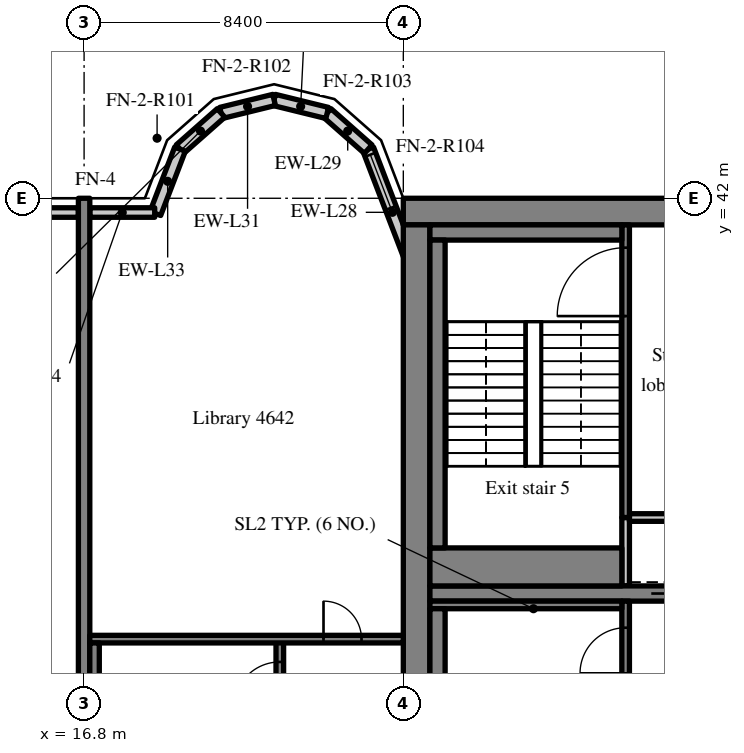
"""IFC4 building model, lengths in metres.
Left out: names, types, materials, properties, quantities, classifications, styles, units other than length and angle.
Written with IfcOpenShell. Run it as: python <this file> out.ifc"""

import sys

from ifc_helpers import new_model, si_unit, direction, frame, frame_2d, origin, place, context, subcontext, project, spatial, rectangle, extrude, source, transform, mapped, element, fill, save


model = new_model("IFC4")
c1 = context("Model", 3, precision=1e-05, world=origin(), true_north=direction((0.0, 1.0)))
c2 = subcontext(c1, "Body", "Model", "MODEL_VIEW")
j1 = project(units=[si_unit("LENGTHUNIT", "METRE"), si_unit("PLANEANGLEUNIT", "RADIAN")], contexts=[c1])
p1 = place(None, origin())
s1 = spatial("IfcSite", under=j1, at=p1, CompositionType="ELEMENT")
p2 = place(p1, origin())
s2 = spatial("IfcBuilding", under=s1, at=p2, CompositionType="ELEMENT")
p3 = place(p2, frame((0.0, 0.0, 189.6)))
s3 = spatial("IfcBuildingStorey", under=s2, at=p3, CompositionType="ELEMENT", Elevation=189.6)
m1 = source(origin(), c2, "Body", "SweptSolid", [
    extrude(rectangle(XDim=50.4, YDim=0.7, at=frame_2d((25.2, 0.0))), origin(), (0.0, 0.0, 1.0), 3.52),
])
p4 = place(p3, frame((25.2, 41.65, 0.0), z_axis=(0.0, 0.0, 1.0), x_axis=(1.0, 0.0, 0.0)))
e1 = element("IfcWall", 1, at=p4, inside=s3, PredefinedType="SHEAR", context=c2, shape_type="MappedRepresentation", body=[
    mapped(m1, transform((0.0, 0.0, 0.0), scale=1.0)),
])
m2 = source(origin(), c2, "Body", "SweptSolid", [
    extrude(rectangle(XDim=18.6, YDim=0.7, at=frame_2d((9.3, 0.0))), origin(), (0.0, 0.0, 1.0), 3.52),
])
p5 = place(p3, frame((25.55, 22.7, 0.0), z_axis=(0.0, 0.0, 1.0), x_axis=(0.0, 1.0, 0.0)))
e2 = element("IfcWall", 2, at=p5, inside=s3, PredefinedType="SHEAR", context=c2, shape_type="MappedRepresentation", body=[
    mapped(m2, transform((0.0, 0.0, 0.0), scale=1.0)),
])
m3 = source(origin(), c2, "Body", "SweptSolid", [
    extrude(rectangle(XDim=7.5, YDim=0.4, at=frame_2d((3.75, 0.0))), origin(), (0.0, 0.0, 1.0), 3.52),
])
p6 = place(p3, frame((25.9, 31.6, 0.0), z_axis=(0.0, 0.0, 1.0), x_axis=(1.0, 0.0, 0.0)))
e3 = element("IfcWall", 3, at=p6, inside=s3, PredefinedType="SHEAR", context=c2, shape_type="MappedRepresentation", body=[
    mapped(m3, transform((0.0, 0.0, 0.0), scale=1.0)),
])
m4 = source(origin(), c2, "Body", "SweptSolid", [
    extrude(rectangle(XDim=1.1, YDim=2.1, at=frame_2d((0.55, 1.05))), frame((0.0, 0.21, 0.0), z_axis=(0.0, -1.0, 0.0), x_axis=(1.0, 0.0, 0.0)), (0.0, 0.0, 1.0), 0.42),
])
p7 = place(p6, frame((5.825, 0.0, 0.0)))
e4 = element("IfcOpeningElement", 4, at=p7, cuts=e3, PredefinedType="OPENING", context=c2, shape_type="MappedRepresentation", body=[
    mapped(m4, transform((0.0, 0.0, 0.0), scale=1.0)),
])
m5 = source(origin(), c2, "Body", "SweptSolid", [
    extrude(rectangle(XDim=20.0, YDim=0.3, at=frame_2d((10.0, 0.0))), origin(), (0.0, 0.0, 1.0), 3.52),
])
p8 = place(p3, frame((16.8, 22.0, 0.0), z_axis=(0.0, 0.0, 1.0), x_axis=(0.0, 1.0, 0.0)))
e5 = element("IfcWall", 5, at=p8, inside=s3, PredefinedType="SHEAR", context=c2, shape_type="MappedRepresentation", body=[
    mapped(m5, transform((0.0, 0.0, 0.0), scale=1.0)),
])
m6 = source(origin(), c2, "Body", "SweptSolid", [
    extrude(rectangle(XDim=3.559, YDim=0.3, at=frame_2d((1.78, 0.0))), origin(), (0.0, 0.0, 1.0), 3.52),
])
p9 = place(p3, frame((25.55, 39.969, 0.0), z_axis=(0.0, 0.0, 1.0), x_axis=(-0.35779745313, 0.933799219604, 0.0)))
e6 = element("IfcWall", 6, at=p9, inside=s3, PredefinedType="SOLIDWALL", context=c2, shape_type="MappedRepresentation", body=[
    mapped(m6, transform((0.0, 0.0, 0.0), scale=1.0)),
])
m7 = source(origin(), c2, "Body", "SweptSolid", [
    extrude(rectangle(XDim=1.5, YDim=2.0, at=frame_2d((0.75, 1.0))), frame((0.0, 0.16, 0.0), z_axis=(0.0, -1.0, 0.0), x_axis=(1.0, 0.0, 0.0)), (0.0, 0.0, 1.0), 0.32),
])
p10 = place(p9, frame((1.903, 0.0, 0.9)))
e7 = element("IfcOpeningElement", 7, at=p10, cuts=e6, PredefinedType="OPENING", context=c2, shape_type="MappedRepresentation", body=[
    mapped(m7, transform((0.0, 0.0, 0.0), scale=1.0)),
])
m8 = source(origin(), c2, "Body", "SweptSolid", [
    extrude(rectangle(XDim=1.44, YDim=0.3, at=frame_2d((0.72, 0.0))), origin(), (0.0, 0.0, 1.0), 3.52),
])
p11 = place(p3, frame((24.277, 43.292, 0.0), z_axis=(0.0, 0.0, 1.0), x_axis=(-0.749649827867, 0.661834673902, 0.0)))
e8 = element("IfcWall", 8, at=p11, inside=s3, PredefinedType="SOLIDWALL", context=c2, shape_type="MappedRepresentation", body=[
    mapped(m8, transform((0.0, 0.0, 0.0), scale=1.0)),
])
m9 = source(origin(), c2, "Body", "SweptSolid", [
    extrude(rectangle(XDim=1.438, YDim=0.3, at=frame_2d((0.719, 0.0))), origin(), (0.0, 0.0, 1.0), 3.52),
])
p12 = place(p3, frame((23.197, 44.245, 0.0), z_axis=(0.0, 0.0, 1.0), x_axis=(-0.971152283879, 0.238460146601, 0.0)))
e9 = element("IfcWall", 9, at=p12, inside=s3, PredefinedType="SOLIDWALL", context=c2, shape_type="MappedRepresentation", body=[
    mapped(m9, transform((0.0, 0.0, 0.0), scale=1.0)),
])
m10 = source(origin(), c2, "Body", "SweptSolid", [
    extrude(rectangle(XDim=1.439, YDim=0.3, at=frame_2d((0.719, 0.0))), origin(), (0.0, 0.0, 1.0), 3.52),
])
p13 = place(p3, frame((21.8, 44.588, 0.0), z_axis=(0.0, 0.0, 1.0), x_axis=(-0.971161932466, -0.238420848351, 0.0)))
e10 = element("IfcWall", 10, at=p13, inside=s3, PredefinedType="SOLIDWALL", context=c2, shape_type="MappedRepresentation", body=[
    mapped(m10, transform((0.0, 0.0, 0.0), scale=1.0)),
])
m11 = source(origin(), c2, "Body", "SweptSolid", [
    extrude(rectangle(XDim=1.44, YDim=0.3, at=frame_2d((0.72, 0.0))), origin(), (0.0, 0.0, 1.0), 3.52),
])
p14 = place(p3, frame((20.403, 44.245, 0.0), z_axis=(0.0, 0.0, 1.0), x_axis=(-0.74957555648, -0.661918790432, 0.0)))
e11 = element("IfcWall", 11, at=p14, inside=s3, PredefinedType="SOLIDWALL", context=c2, shape_type="MappedRepresentation", body=[
    mapped(m11, transform((0.0, 0.0, 0.0), scale=1.0)),
])
m12 = source(origin(), c2, "Body", "SweptSolid", [
    extrude(rectangle(XDim=1.812, YDim=0.3, at=frame_2d((0.906, 0.0))), origin(), (0.0, 0.0, 1.0), 3.52),
])
p15 = place(p3, frame((19.323, 43.292, 0.0), z_axis=(0.0, 0.0, 1.0), x_axis=(-0.357877270961, -0.93376863244, 0.0)))
e12 = element("IfcWall", 12, at=p15, inside=s3, PredefinedType="SOLIDWALL", context=c2, shape_type="MappedRepresentation", body=[
    mapped(m12, transform((0.0, 0.0, 0.0), scale=1.0)),
])
m13 = source(origin(), c2, "Body", "SweptSolid", [
    extrude(rectangle(XDim=4.094, YDim=0.25, at=frame_2d((2.047, 0.0))), origin(), (0.0, 0.0, 1.0), 2.87),
])
p16 = place(p3, frame((16.65, 41.625, 0.0), z_axis=(0.0, 0.0, 1.0), x_axis=(-1.0, 0.0, 0.0)))
e13 = element("IfcWall", 13, at=p16, inside=s3, PredefinedType="SOLIDWALL", context=c2, shape_type="MappedRepresentation", body=[
    mapped(m13, transform((0.0, 0.0, 0.0), scale=1.0)),
])
m14 = source(origin(), c2, "Body", "SweptSolid", [
    extrude(rectangle(XDim=1.5, YDim=1.5, at=frame_2d((0.75, 0.75))), frame((0.0, 0.135, 0.0), z_axis=(0.0, -1.0, 0.0), x_axis=(1.0, 0.0, 0.0)), (0.0, 0.0, 1.0), 0.27),
])
p17 = place(p16, frame((1.297, 0.0, 0.9)))
e14 = element("IfcOpeningElement", 14, at=p17, cuts=e13, PredefinedType="OPENING", context=c2, shape_type="MappedRepresentation", body=[
    mapped(m14, transform((0.0, 0.0, 0.0), scale=1.0)),
])
m15 = source(origin(), c2, "Body", "SweptSolid", [
    extrude(rectangle(XDim=1.708, YDim=0.25, at=frame_2d((0.854, 0.0))), origin(), (0.0, 0.0, 1.0), 2.87),
])
p18 = place(p3, frame((18.658, 41.625, 0.0), z_axis=(0.0, 0.0, 1.0), x_axis=(-1.0, 0.0, 0.0)))
e15 = element("IfcWall", 15, at=p18, inside=s3, PredefinedType="SOLIDWALL", context=c2, shape_type="MappedRepresentation", body=[
    mapped(m15, transform((0.0, 0.0, 0.0), scale=1.0)),
])
m16 = source(origin(), c2, "Body", "SweptSolid", [
    extrude(rectangle(XDim=8.7, YDim=0.2, at=frame_2d((4.35, 0.0))), origin(), (0.0, 0.0, 1.0), 3.52),
])
p19 = place(p3, frame((31.05, 22.7, 0.0), z_axis=(0.0, 0.0, 1.0), x_axis=(0.0, 1.0, 0.0)))
e16 = element("IfcWall", 16, at=p19, inside=s3, PredefinedType="SOLIDWALL", context=c2, shape_type="MappedRepresentation", body=[
    mapped(m16, transform((0.0, 0.0, 0.0), scale=1.0)),
])
m17 = source(origin(), c2, "Body", "SweptSolid", [
    extrude(rectangle(XDim=1.2, YDim=2.1, at=frame_2d((0.6, 1.05))), frame((0.0, 0.11, 0.0), z_axis=(0.0, -1.0, 0.0), x_axis=(1.0, 0.0, 0.0)), (0.0, 0.0, 1.0), 0.22),
])
p20 = place(p19, frame((6.8, 0.0, 0.0)))
e17 = element("IfcOpeningElement", 17, at=p20, cuts=e16, PredefinedType="OPENING", context=c2, shape_type="MappedRepresentation", body=[
    mapped(m17, transform((0.0, 0.0, 0.0), scale=1.0)),
])
m18 = source(origin(), c2, "Body", "SweptSolid", [
    extrude(rectangle(XDim=1.8, YDim=0.2, at=frame_2d((0.9, 0.0))), origin(), (0.0, 0.0, 1.0), 3.52),
])
p21 = place(p3, frame((31.05, 31.8, 0.0), z_axis=(0.0, 0.0, 1.0), x_axis=(0.0, 1.0, 0.0)))
e18 = element("IfcWall", 18, at=p21, inside=s3, PredefinedType="SOLIDWALL", context=c2, shape_type="MappedRepresentation", body=[
    mapped(m18, transform((0.0, 0.0, 0.0), scale=1.0)),
])
m19 = source(origin(), c2, "Body", "SweptSolid", [
    extrude(rectangle(XDim=2.25, YDim=0.2, at=frame_2d((1.125, 0.0))), origin(), (0.0, 0.0, 1.0), 3.52),
])
p22 = place(p3, frame((31.15, 33.6, 0.0), z_axis=(0.0, 0.0, 1.0), x_axis=(1.0, 0.0, 0.0)))
e19 = element("IfcWall", 19, at=p22, inside=s3, PredefinedType="SOLIDWALL", context=c2, shape_type="MappedRepresentation", body=[
    mapped(m19, transform((0.0, 0.0, 0.0), scale=1.0)),
])
m20 = source(origin(), c2, "Body", "SweptSolid", [
    extrude(rectangle(XDim=7.7, YDim=0.2, at=frame_2d((3.85, 0.0))), origin(), (0.0, 0.0, 1.0), 3.52),
])
p23 = place(p3, frame((31.05, 33.6, 0.0), z_axis=(0.0, 0.0, 1.0), x_axis=(0.0, 1.0, 0.0)))
e20 = element("IfcWall", 20, at=p23, inside=s3, PredefinedType="SOLIDWALL", context=c2, shape_type="MappedRepresentation", body=[
    mapped(m20, transform((0.0, 0.0, 0.0), scale=1.0)),
])
m21 = source(origin(), c2, "Body", "SweptSolid", [
    extrude(rectangle(XDim=1.8, YDim=2.1, at=frame_2d((0.9, 1.05))), frame((0.0, 0.11, 0.0), z_axis=(0.0, -1.0, 0.0), x_axis=(1.0, 0.0, 0.0)), (0.0, 0.0, 1.0), 0.22),
])
p24 = place(p23, frame((5.3, 0.0, 0.0)))
e21 = element("IfcOpeningElement", 21, at=p24, cuts=e20, PredefinedType="OPENING", context=c2, shape_type="MappedRepresentation", body=[
    mapped(m21, transform((0.0, 0.0, 0.0), scale=1.0)),
])
m22 = source(origin(), c2, "Body", "SweptSolid", [
    extrude(rectangle(XDim=8.3, YDim=0.2, at=frame_2d((4.15, 0.0))), origin(), (0.0, 0.0, 1.0), 3.52),
])
p25 = place(p3, frame((21.95, 22.1, 0.0), z_axis=(0.0, 0.0, 1.0), x_axis=(0.0, 1.0, 0.0)))
e22 = element("IfcWall", 22, at=p25, inside=s3, PredefinedType="SOLIDWALL", context=c2, shape_type="MappedRepresentation", body=[
    mapped(m22, transform((0.0, 0.0, 0.0), scale=1.0)),
])
p26 = place(p25, frame((6.5, 0.0, 0.0)))
e23 = element("IfcOpeningElement", 23, at=p26, cuts=e22, PredefinedType="OPENING", context=c2, shape_type="MappedRepresentation", body=[
    mapped(m17, transform((0.0, 0.0, 0.0), scale=1.0)),
])
m23 = source(origin(), c2, "Body", "SweptSolid", [
    extrude(rectangle(XDim=8.25, YDim=0.2, at=frame_2d((4.125, 0.0))), origin(), (0.0, 0.0, 1.0), 3.52),
])
p27 = place(p3, frame((16.95, 30.4, 0.0), z_axis=(0.0, 0.0, 1.0), x_axis=(1.0, 0.0, 0.0)))
e24 = element("IfcWall", 24, at=p27, inside=s3, PredefinedType="SOLIDWALL", context=c2, shape_type="MappedRepresentation", body=[
    mapped(m23, transform((0.0, 0.0, 0.0), scale=1.0)),
])
m24 = source(origin(), c2, "Body", "SweptSolid", [
    extrude(rectangle(XDim=1.0, YDim=2.1, at=frame_2d((0.5, 1.05))), frame((0.0, 0.11, 0.0), z_axis=(0.0, -1.0, 0.0), x_axis=(1.0, 0.0, 0.0)), (0.0, 0.0, 1.0), 0.22),
])
p28 = place(p27, frame((6.15, 0.0, 0.0)))
e25 = element("IfcOpeningElement", 25, at=p28, cuts=e24, PredefinedType="OPENING", context=c2, shape_type="MappedRepresentation", body=[
    mapped(m24, transform((0.0, 0.0, 0.0), scale=1.0)),
])
m25 = source(origin(), c2, "Body", "SweptSolid", [
    extrude(rectangle(XDim=5.05, YDim=0.2, at=frame_2d((2.525, 0.0))), origin(), (0.0, 0.0, 1.0), 3.52),
])
p29 = place(p3, frame((25.9, 31.3, 0.0), z_axis=(0.0, 0.0, 1.0), x_axis=(1.0, 0.0, 0.0)))
e26 = element("IfcWall", 26, at=p29, inside=s3, PredefinedType="SOLIDWALL", context=c2, shape_type="MappedRepresentation", body=[
    mapped(m25, transform((0.0, 0.0, 0.0), scale=1.0)),
])
m26 = source(origin(), c2, "Body", "SweptSolid", [
    extrude(rectangle(XDim=8.1, YDim=0.4, at=frame_2d((4.05, 0.0))), origin(), (0.0, 0.0, 1.0), 3.52),
])
p30 = place(p3, frame((26.1, 23.1, 0.0), z_axis=(0.0, 0.0, 1.0), x_axis=(0.0, 1.0, 0.0)))
e27 = element("IfcWall", 27, at=p30, inside=s3, PredefinedType="SOLIDWALL", context=c2, shape_type="MappedRepresentation", body=[
    mapped(m26, transform((0.0, 0.0, 0.0), scale=1.0)),
])
m27 = source(origin(), c2, "Body", "SweptSolid", [
    extrude(rectangle(XDim=8.1, YDim=0.25, at=frame_2d((4.05, 0.0))), origin(), (0.0, 0.0, 1.0), 3.52),
])
p31 = place(p3, frame((17.075, 22.2, 0.0), z_axis=(0.0, 0.0, 1.0), x_axis=(0.0, 1.0, 0.0)))
e28 = element("IfcWall", 28, at=p31, inside=s3, PredefinedType="SOLIDWALL", context=c2, shape_type="MappedRepresentation", body=[
    mapped(m27, transform((0.0, 0.0, 0.0), scale=1.0)),
])
m28 = source(origin(), c2, "Body", "SweptSolid", [
    extrude(rectangle(XDim=5.05, YDim=0.4, at=frame_2d((2.525, 0.0))), origin(), (0.0, 0.0, 1.0), 3.52),
])
p32 = place(p3, frame((25.9, 41.1, 0.0), z_axis=(0.0, 0.0, 1.0), x_axis=(1.0, 0.0, 0.0)))
e29 = element("IfcWall", 29, at=p32, inside=s3, PredefinedType="SOLIDWALL", context=c2, shape_type="MappedRepresentation", body=[
    mapped(m28, transform((0.0, 0.0, 0.0), scale=1.0)),
])
m29 = source(origin(), c2, "Body", "SweptSolid", [
    extrude(rectangle(XDim=5.05, YDim=1.0, at=frame_2d((2.525, 0.0))), origin(), (0.0, 0.0, 1.0), 3.52),
])
p33 = place(p3, frame((25.9, 32.3, 0.0), z_axis=(0.0, 0.0, 1.0), x_axis=(1.0, 0.0, 0.0)))
e30 = element("IfcWall", 30, at=p33, inside=s3, PredefinedType="SOLIDWALL", context=c2, shape_type="MappedRepresentation", body=[
    mapped(m29, transform((0.0, 0.0, 0.0), scale=1.0)),
])
p34 = place(p3, frame((26.1, 32.8, 0.0), z_axis=(0.0, 0.0, 1.0), x_axis=(0.0, 1.0, 0.0)))
e31 = element("IfcWall", 31, at=p34, inside=s3, PredefinedType="SOLIDWALL", context=c2, shape_type="MappedRepresentation", body=[
    mapped(m26, transform((0.0, 0.0, 0.0), scale=1.0)),
])
m30 = source(origin(), c2, "Body", "SweptSolid", [
    extrude(rectangle(XDim=1.5, YDim=2.0, at=frame_2d((0.75, 1.0))), frame((0.0, 0.03, 0.0), z_axis=(0.0, -1.0, 0.0), x_axis=(1.0, 0.0, 0.0)), (0.0, 0.0, 1.0), 0.06),
])
p35 = place(p10, origin())
e32 = element("IfcWindow", 32, at=p35, inside=s3, PartitioningType="SINGLE_PANEL", PredefinedType="WINDOW", context=c2, shape_type="MappedRepresentation", body=[
    mapped(m30, transform((0.0, 0.0, 0.0), scale=1.0)),
])
fill(e7, e32)
m31 = source(origin(), c2, "Body", "SweptSolid", [
    extrude(rectangle(XDim=1.2, YDim=2.1, at=frame_2d((0.6, 1.05))), frame((0.0, 0.025, 0.0), z_axis=(0.0, -1.0, 0.0), x_axis=(1.0, 0.0, 0.0)), (0.0, 0.0, 1.0), 0.05),
])
p36 = place(p20, origin())
e33 = element("IfcDoor", 33, at=p36, inside=s3, OperationType="SINGLE_SWING_LEFT", PredefinedType="DOOR", context=c2, shape_type="MappedRepresentation", body=[
    mapped(m31, transform((0.0, 0.0, 0.0), scale=1.0)),
])
fill(e17, e33)
m32 = source(origin(), c2, "Body", "SweptSolid", [
    extrude(rectangle(XDim=1.1, YDim=2.1, at=frame_2d((0.55, 1.05))), frame((0.0, 0.025, 0.0), z_axis=(0.0, -1.0, 0.0), x_axis=(1.0, 0.0, 0.0)), (0.0, 0.0, 1.0), 0.05),
])
p37 = place(p7, origin())
e34 = element("IfcDoor", 34, at=p37, inside=s3, OperationType="SLIDING_TO_RIGHT", PredefinedType="DOOR", context=c2, shape_type="MappedRepresentation", body=[
    mapped(m32, transform((0.0, 0.0, 0.0), scale=1.0)),
])
fill(e4, e34)
m33 = source(origin(), c2, "Body", "SweptSolid", [
    extrude(rectangle(XDim=1.8, YDim=2.1, at=frame_2d((0.9, 1.05))), frame((0.0, 0.025, 0.0), z_axis=(0.0, -1.0, 0.0), x_axis=(1.0, 0.0, 0.0)), (0.0, 0.0, 1.0), 0.05),
])
p38 = place(p24, origin())
e35 = element("IfcDoor", 35, at=p38, inside=s3, OperationType="SINGLE_SWING_LEFT", PredefinedType="DOOR", context=c2, shape_type="MappedRepresentation", body=[
    mapped(m33, transform((0.0, 0.0, 0.0), scale=1.0)),
])
fill(e21, e35)
p39 = place(p26, origin())
e36 = element("IfcDoor", 36, at=p39, inside=s3, OperationType="SINGLE_SWING_LEFT", PredefinedType="DOOR", context=c2, shape_type="MappedRepresentation", body=[
    mapped(m31, transform((0.0, 0.0, 0.0), scale=1.0)),
])
fill(e23, e36)
m34 = source(origin(), c2, "Body", "SweptSolid", [
    extrude(rectangle(XDim=1.0, YDim=2.1, at=frame_2d((0.5, 1.05))), frame((0.0, 0.025, 0.0), z_axis=(0.0, -1.0, 0.0), x_axis=(1.0, 0.0, 0.0)), (0.0, 0.0, 1.0), 0.05),
])
p40 = place(p28, origin())
e37 = element("IfcDoor", 37, at=p40, inside=s3, OperationType="SINGLE_SWING_LEFT", PredefinedType="DOOR", context=c2, shape_type="MappedRepresentation", body=[
    mapped(m34, transform((0.0, 0.0, 0.0), scale=1.0)),
])
fill(e25, e37)
save(model, sys.argv[1])
